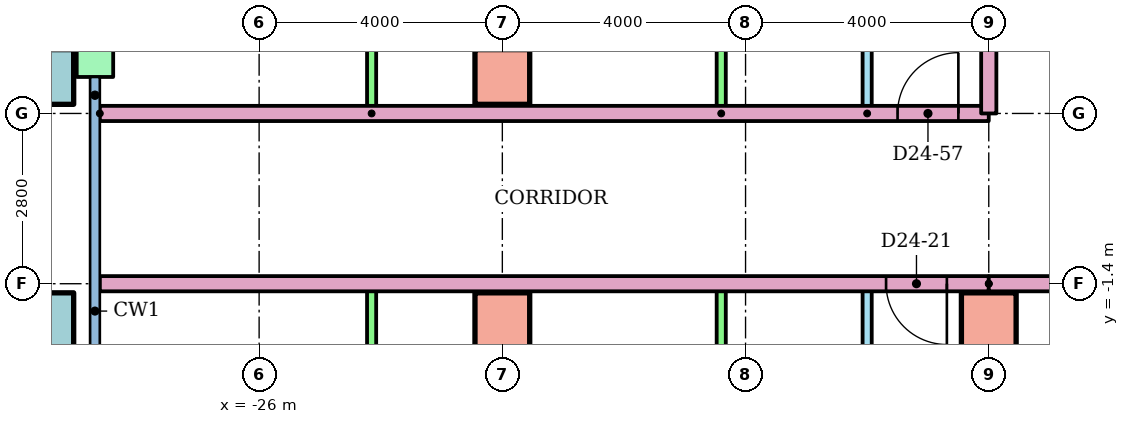
"""IFC4 building model, lengths in metres.
Left out: names, types, materials, properties, quantities, classifications, styles, units other than length and angle.
Written with IfcOpenShell. Run it as: python <this file> out.ifc"""

import sys

from ifc_helpers import new_model, si_unit, direction, frame, frame_2d, origin, origin_2d, place, context, subcontext, project, spatial, rectangle, hollow_rectangle, extrude, element, fill, save


model = new_model("IFC4")
c1 = context("Model", 3, precision=1e-05, world=origin(), true_north=direction((0.0, 1.0)))
c2 = subcontext(c1, "Body", "Model", "MODEL_VIEW")
j1 = project(units=[si_unit("LENGTHUNIT", "METRE"), si_unit("PLANEANGLEUNIT", "RADIAN")], contexts=[c1])
p1 = place(None, origin())
s1 = spatial("IfcSite", under=j1, at=p1, CompositionType="ELEMENT")
p2 = place(p1, origin())
s2 = spatial("IfcBuilding", under=s1, at=p2, CompositionType="ELEMENT")
p3 = place(p2, frame((0.0, 0.0, 93.5)))
s3 = spatial("IfcBuildingStorey", under=s2, at=p3, CompositionType="ELEMENT", Elevation=93.5)
p4 = place(p3, frame((-29.5, -2.0, 0.0)))
e1 = element("IfcColumn", 1, at=p4, inside=s3, PredefinedType="COLUMN", context=c2, shape_type="SweptSolid", body=[
    extrude(hollow_rectangle(XDim=0.9, YDim=0.9, WallThickness=0.045, at=origin_2d()), origin(), (0.0, 0.0, 1.0), 3.2),
])
for number, where in (
    (2, (-22.0, -2.0, 0.0)),
    (3, (-14.0, -2.0, 0.0)),
):
    element("IfcColumn", number, at=place(p3, frame(where)), inside=s3, PredefinedType="COLUMN", context=c2, shape_type="SweptSolid", body=[
        extrude(rectangle(XDim=0.9, YDim=0.9, at=origin_2d()), origin(), (0.0, 0.0, 1.0), 3.2),
    ])
p5 = place(p3, frame((-29.5, 2.0, 0.0)))
e4 = element("IfcColumn", 4, at=p5, inside=s3, PredefinedType="COLUMN", context=c2, shape_type="SweptSolid", body=[
    extrude(hollow_rectangle(XDim=0.9, YDim=0.9, WallThickness=0.045, at=origin_2d()), origin(), (0.0, 0.0, 1.0), 3.2),
])
p6 = place(p3, frame((-22.0, 2.0, 0.0)))
e5 = element("IfcColumn", 5, at=p6, inside=s3, PredefinedType="COLUMN", context=c2, shape_type="SweptSolid", body=[
    extrude(rectangle(XDim=0.9, YDim=0.9, at=origin_2d()), origin(), (0.0, 0.0, 1.0), 3.2),
])
p7 = place(p3, frame((-28.7, 6.5, 0.0), z_axis=(0.0, 0.0, 1.0), x_axis=(0.0, -1.0, 0.0)))
e6 = element("IfcWall", 6, at=p7, inside=s3, PredefinedType="STANDARD", context=c2, shape_type="SweptSolid", body=[
    extrude(rectangle(XDim=4.5, YDim=0.6, at=frame_2d((2.25, 0.0))), origin(), (0.0, 0.0, 1.0), 2.92),
])
p8 = place(p7, frame((1.65, 0.0, 0.0)))
e7 = element("IfcOpeningElement", 7, at=p8, cuts=e6, PredefinedType="OPENING", context=c2, shape_type="SweptSolid", body=[
    extrude(rectangle(XDim=1.2, YDim=2.1, at=frame_2d((0.6, 1.05))), frame((0.0, 0.31, 0.0), z_axis=(0.0, -1.0, 0.0), x_axis=(1.0, 0.0, 0.0)), (0.0, 0.0, 1.0), 0.62),
])
p9 = place(p3, frame((-16.0, -9.1, 0.0), z_axis=(0.0, 0.0, 1.0), x_axis=(0.0, 1.0, 0.0)))
e8 = element("IfcWall", 8, at=p9, inside=s3, PredefinedType="PARTITIONING", context=c2, shape_type="SweptSolid", body=[
    extrude(rectangle(XDim=7.7, YDim=0.15, at=frame_2d((3.85, 0.0))), origin(), (0.0, 0.0, 1.0), 2.4),
])
p10 = place(p9, frame((5.125, 0.0, 0.0)))
e9 = element("IfcOpeningElement", 9, at=p10, cuts=e8, PredefinedType="OPENING", context=c2, shape_type="SweptSolid", body=[
    extrude(rectangle(XDim=0.9, YDim=2.1, at=frame_2d((0.45, 1.05))), frame((0.0, 0.085, 0.0), z_axis=(0.0, -1.0, 0.0), x_axis=(1.0, 0.0, 0.0)), (0.0, 0.0, 1.0), 0.17),
])
p11 = place(p9, frame((1.325, 0.0, 0.0)))
e10 = element("IfcOpeningElement", 10, at=p11, cuts=e8, PredefinedType="OPENING", context=c2, shape_type="SweptSolid", body=[
    extrude(rectangle(XDim=0.8, YDim=2.1, at=frame_2d((0.4, 1.05))), frame((0.0, 0.085, 0.0), z_axis=(0.0, -1.0, 0.0), x_axis=(1.0, 0.0, 0.0)), (0.0, 0.0, 1.0), 0.17),
])
for number, where, z_axis, x_axis in (
    (11, (-18.4, -9.1, 0.0), (0.0, 0.0, 1.0), (0.0, 1.0, 0.0)),
    (12, (-24.15, -9.1, 0.0), (0.0, 0.0, 1.0), (0.0, 1.0, 0.0)),
):
    element("IfcWall", number, at=place(p3, frame(where, z_axis=z_axis, x_axis=x_axis)), inside=s3, PredefinedType="PARTITIONING", context=c2, shape_type="SweptSolid", body=[
        extrude(rectangle(XDim=7.7, YDim=0.15, at=frame_2d((3.85, 0.0))), origin(), (0.0, 0.0, 1.0), 2.4),
    ])
p12 = place(p3, frame((-14.0, -1.4, 0.0), z_axis=(0.0, 0.0, 1.0), x_axis=(0.0, -1.0, 0.0)))
e13 = element("IfcWall", 13, at=p12, inside=s3, PredefinedType="PARTITIONING", context=c2, shape_type="SweptSolid", body=[
    extrude(rectangle(XDim=14.81, YDim=0.25, at=frame_2d((7.405, 0.0))), origin(), (0.0, 0.0, 1.0), 2.4),
])
p13 = place(p3, frame((-14.0, -1.4, 0.0), z_axis=(0.0, 0.0, 1.0), x_axis=(-1.0, 0.0, 0.0)))
e14 = element("IfcWall", 14, at=p13, inside=s3, PredefinedType="PARTITIONING", context=c2, shape_type="SweptSolid", body=[
    extrude(rectangle(XDim=14.62, YDim=0.25, at=frame_2d((7.31, 0.0))), origin(), (0.0, 0.0, 1.0), 2.4),
])
p14 = place(p13, frame((0.689, 0.0, 0.0)))
e15 = element("IfcOpeningElement", 15, at=p14, cuts=e14, PredefinedType="OPENING", context=c2, shape_type="SweptSolid", body=[
    extrude(rectangle(XDim=1.0, YDim=2.1, at=frame_2d((0.5, 1.05))), frame((0.0, 0.135, 0.0), z_axis=(0.0, -1.0, 0.0), x_axis=(1.0, 0.0, 0.0)), (0.0, 0.0, 1.0), 0.27),
])
p15 = place(p3, frame((-16.0, 1.4, 0.0), z_axis=(0.0, 0.0, 1.0), x_axis=(0.0, 1.0, 0.0)))
e16 = element("IfcWall", 16, at=p15, inside=s3, PredefinedType="PARTITIONING", context=c2, shape_type="SweptSolid", body=[
    extrude(rectangle(XDim=10.1, YDim=0.15, at=frame_2d((5.05, 0.0))), origin(), (0.0, 0.0, 1.0), 2.4),
])
p16 = place(p15, frame((2.3, 0.0, 0.0)))
e17 = element("IfcOpeningElement", 17, at=p16, cuts=e16, PredefinedType="OPENING", context=c2, shape_type="SweptSolid", body=[
    extrude(rectangle(XDim=0.9, YDim=2.1, at=frame_2d((0.45, 1.05))), frame((0.0, 0.085, 0.0), z_axis=(0.0, -1.0, 0.0), x_axis=(1.0, 0.0, 0.0)), (0.0, 0.0, 1.0), 0.17),
])
p17 = place(p15, frame((7.4, 0.0, 0.0)))
e18 = element("IfcOpeningElement", 18, at=p17, cuts=e16, PredefinedType="OPENING", context=c2, shape_type="SweptSolid", body=[
    extrude(rectangle(XDim=0.8, YDim=2.1, at=frame_2d((0.4, 1.05))), frame((0.0, 0.085, 0.0), z_axis=(0.0, -1.0, 0.0), x_axis=(1.0, 0.0, 0.0)), (0.0, 0.0, 1.0), 0.17),
])
for number, where, z_axis, x_axis in (
    (19, (-18.4, 1.4, 0.0), (0.0, 0.0, 1.0), (0.0, 1.0, 0.0)),
    (20, (-24.15, 1.4, 0.0), (0.0, 0.0, 1.0), (0.0, 1.0, 0.0)),
):
    element("IfcWall", number, at=place(p3, frame(where, z_axis=z_axis, x_axis=x_axis)), inside=s3, PredefinedType="PARTITIONING", context=c2, shape_type="SweptSolid", body=[
        extrude(rectangle(XDim=10.1, YDim=0.15, at=frame_2d((5.05, 0.0))), origin(), (0.0, 0.0, 1.0), 2.4),
    ])
p18 = place(p3, frame((-28.62, 1.4, 0.0)))
e21 = element("IfcWall", 21, at=p18, inside=s3, PredefinedType="PARTITIONING", context=c2, shape_type="SweptSolid", body=[
    extrude(rectangle(XDim=14.62, YDim=0.25, at=frame_2d((7.31, 0.0))), origin(), (0.0, 0.0, 1.0), 2.4),
])
p19 = place(p18, frame((13.12, 0.0, 0.0)))
e22 = element("IfcOpeningElement", 22, at=p19, cuts=e21, PredefinedType="OPENING", context=c2, shape_type="SweptSolid", body=[
    extrude(rectangle(XDim=1.0, YDim=2.1, at=frame_2d((0.5, 1.05))), frame((0.0, 0.135, 0.0), z_axis=(0.0, -1.0, 0.0), x_axis=(1.0, 0.0, 0.0)), (0.0, 0.0, 1.0), 0.27),
])
p20 = place(p3, frame((14.0, -1.4, 0.0), z_axis=(0.0, 0.0, 1.0), x_axis=(-1.0, 0.0, 0.0)))
e23 = element("IfcWall", 23, at=p20, inside=s3, PredefinedType="PARTITIONING", context=c2, shape_type="SweptSolid", body=[
    extrude(rectangle(XDim=28.0, YDim=0.25, at=frame_2d((14.0, 0.0))), origin(), (0.0, 0.0, 1.0), 2.4),
])
p21 = place(p20, frame((12.689, 0.0, 0.0)))
e24 = element("IfcOpeningElement", 24, at=p21, cuts=e23, PredefinedType="OPENING", context=c2, shape_type="SweptSolid", body=[
    extrude(rectangle(XDim=1.0, YDim=2.1, at=frame_2d((0.5, 1.05))), frame((0.0, 0.135, 0.0), z_axis=(0.0, -1.0, 0.0), x_axis=(1.0, 0.0, 0.0)), (0.0, 0.0, 1.0), 0.27),
])
p22 = place(p20, frame((10.311, 0.0, 0.0)))
e25 = element("IfcOpeningElement", 25, at=p22, cuts=e23, PredefinedType="OPENING", context=c2, shape_type="SweptSolid", body=[
    extrude(rectangle(XDim=1.0, YDim=2.1, at=frame_2d((0.5, 1.05))), frame((0.0, 0.135, 0.0), z_axis=(0.0, -1.0, 0.0), x_axis=(1.0, 0.0, 0.0)), (0.0, 0.0, 1.0), 0.27),
])
p23 = place(p3, frame((-14.0, 3.0, 0.0), z_axis=(0.0, 0.0, 1.0), x_axis=(0.0, -1.0, 0.0)))
e26 = element("IfcWall", 26, at=p23, inside=s3, PredefinedType="PARTITIONING", context=c2, shape_type="SweptSolid", body=[
    extrude(rectangle(XDim=1.6, YDim=0.25, at=frame_2d((0.8, 0.0))), origin(), (0.0, 0.0, 1.0), 2.4),
])
p24 = place(p14, origin())
e27 = element("IfcDoor", 27, at=p24, inside=s3, OperationType="SINGLE_SWING_LEFT", PredefinedType="DOOR", context=c2, shape_type="SweptSolid", body=[
    extrude(rectangle(XDim=1.0, YDim=2.1, at=frame_2d((0.5, 1.05))), frame((0.0, 0.025, 0.0), z_axis=(0.0, -1.0, 0.0), x_axis=(1.0, 0.0, 0.0)), (0.0, 0.0, 1.0), 0.05),
])
fill(e15, e27)
p25 = place(p19, origin())
e28 = element("IfcDoor", 28, at=p25, inside=s3, OperationType="SINGLE_SWING_RIGHT", PredefinedType="DOOR", context=c2, shape_type="SweptSolid", body=[
    extrude(rectangle(XDim=1.0, YDim=2.1, at=frame_2d((0.5, 1.05))), frame((0.0, 0.025, 0.0), z_axis=(0.0, -1.0, 0.0), x_axis=(1.0, 0.0, 0.0)), (0.0, 0.0, 1.0), 0.05),
])
fill(e22, e28)
save(model, sys.argv[1])
